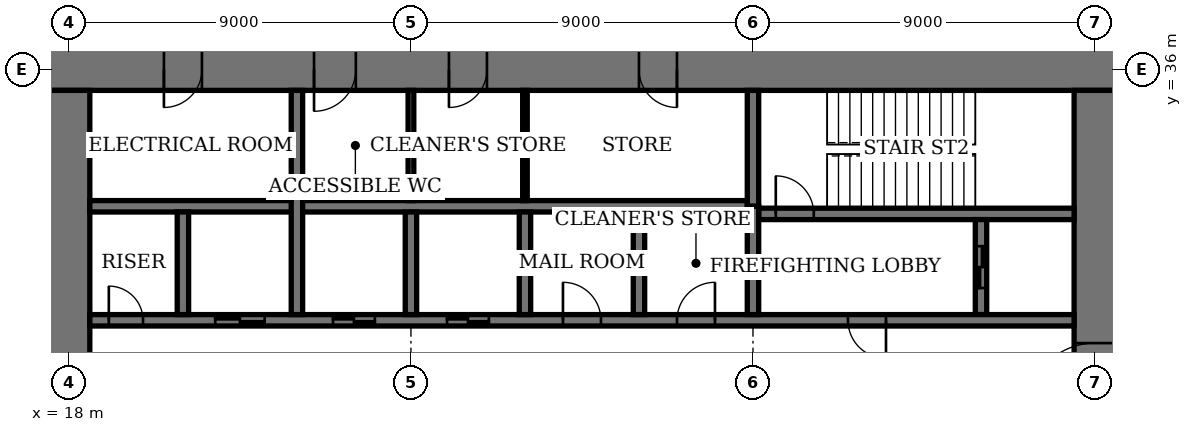
"""IFC4 building model, lengths in metres.
Left out: names, types, materials, properties, quantities, classifications, styles, units other than length and angle.
Written with IfcOpenShell. Run it as: python <this file> out.ifc"""

import sys

from ifc_helpers import new_model, si_unit, direction, frame, frame_2d, origin, place, context, subcontext, project, spatial, rectangle, extrude, element, fill, save


model = new_model("IFC4")
c1 = context("Model", 3, precision=1e-05, world=origin(), true_north=direction((0.0, 1.0)))
c2 = subcontext(c1, "Body", "Model", "MODEL_VIEW")
j1 = project(units=[si_unit("LENGTHUNIT", "METRE"), si_unit("PLANEANGLEUNIT", "RADIAN")], contexts=[c1])
p1 = place(None, origin())
s1 = spatial("IfcSite", under=j1, at=p1, CompositionType="ELEMENT")
p2 = place(p1, origin())
s2 = spatial("IfcBuilding", under=s1, at=p2, CompositionType="ELEMENT")
p3 = place(p2, frame((0.0, 0.0, 170.2)))
s3 = spatial("IfcBuildingStorey", under=s2, at=p3, CompositionType="ELEMENT", Elevation=170.2)
p4 = place(p3, frame((45.55, 36.0, 0.0), z_axis=(0.0, 0.0, 1.0), x_axis=(-1.0, 0.0, 0.0)))
e1 = element("IfcWall", 1, at=p4, inside=s3, PredefinedType="SHEAR", context=c2, shape_type="SweptSolid", body=[
    extrude(rectangle(XDim=28.1, YDim=1.1, at=frame_2d((14.05, 0.0))), origin(), (0.0, 0.0, 1.0), 4.0),
])
p5 = place(p4, frame((11.55, 0.0, 0.0)))
e2 = element("IfcOpeningElement", 2, at=p5, cuts=e1, PredefinedType="OPENING", context=c2, shape_type="SweptSolid", body=[
    extrude(rectangle(XDim=1.0, YDim=2.4, at=frame_2d((0.5, 1.2))), frame((0.0, 0.56, 0.0), z_axis=(0.0, -1.0, 0.0), x_axis=(1.0, 0.0, 0.0)), (0.0, 0.0, 1.0), 1.12),
])
p6 = place(p4, frame((16.55, 0.0, 0.0)))
e3 = element("IfcOpeningElement", 3, at=p6, cuts=e1, PredefinedType="OPENING", context=c2, shape_type="SweptSolid", body=[
    extrude(rectangle(XDim=1.0, YDim=2.4, at=frame_2d((0.5, 1.2))), frame((0.0, 0.56, 0.0), z_axis=(0.0, -1.0, 0.0), x_axis=(1.0, 0.0, 0.0)), (0.0, 0.0, 1.0), 1.12),
])
p7 = place(p4, frame((20.0, 0.0, 0.0)))
e4 = element("IfcOpeningElement", 4, at=p7, cuts=e1, PredefinedType="OPENING", context=c2, shape_type="SweptSolid", body=[
    extrude(rectangle(XDim=1.1, YDim=2.4, at=frame_2d((0.55, 1.2))), frame((0.0, 0.56, 0.0), z_axis=(0.0, -1.0, 0.0), x_axis=(1.0, 0.0, 0.0)), (0.0, 0.0, 1.0), 1.12),
])
p8 = place(p4, frame((24.05, 0.0, 0.0)))
e5 = element("IfcOpeningElement", 5, at=p8, cuts=e1, PredefinedType="OPENING", context=c2, shape_type="SweptSolid", body=[
    extrude(rectangle(XDim=1.0, YDim=2.4, at=frame_2d((0.5, 1.2))), frame((0.0, 0.56, 0.0), z_axis=(0.0, -1.0, 0.0), x_axis=(1.0, 0.0, 0.0)), (0.0, 0.0, 1.0), 1.12),
])
p9 = place(p3, frame((18.0, 35.45, 0.0), z_axis=(0.0, 0.0, 1.0), x_axis=(0.0, -1.0, 0.0)))
e6 = element("IfcWall", 6, at=p9, inside=s3, PredefinedType="SHEAR", context=c2, shape_type="SweptSolid", body=[
    extrude(rectangle(XDim=16.9, YDim=1.1, at=frame_2d((8.45, 0.0))), origin(), (0.0, 0.0, 1.0), 4.0),
])
p10 = place(p9, frame((8.45, 0.0, 0.0)))
e7 = element("IfcOpeningElement", 7, at=p10, cuts=e6, PredefinedType="OPENING", context=c2, shape_type="SweptSolid", body=[
    extrude(rectangle(XDim=1.8, YDim=2.4, at=frame_2d((0.9, 1.2))), frame((0.0, 0.56, 0.0), z_axis=(0.0, -1.0, 0.0), x_axis=(1.0, 0.0, 0.0)), (0.0, 0.0, 1.0), 1.12),
])
p11 = place(p3, frame((45.0, 18.55, 0.0), z_axis=(0.0, 0.0, 1.0), x_axis=(0.0, 1.0, 0.0)))
e8 = element("IfcWall", 8, at=p11, inside=s3, PredefinedType="SHEAR", context=c2, shape_type="SweptSolid", body=[
    extrude(rectangle(XDim=16.9, YDim=1.1, at=frame_2d((8.45, 0.0))), origin(), (0.0, 0.0, 1.0), 4.0),
])
p12 = place(p11, frame((8.45, 0.0, 0.0)))
e9 = element("IfcOpeningElement", 9, at=p12, cuts=e8, PredefinedType="OPENING", context=c2, shape_type="SweptSolid", body=[
    extrude(rectangle(XDim=1.8, YDim=2.4, at=frame_2d((0.9, 1.2))), frame((0.0, 0.56, 0.0), z_axis=(0.0, -1.0, 0.0), x_axis=(1.0, 0.0, 0.0)), (0.0, 0.0, 1.0), 1.12),
])
p13 = place(p3, frame((36.15, 32.2, 0.0), z_axis=(0.0, 0.0, 1.0), x_axis=(1.0, 0.0, 0.0)))
e10 = element("IfcWall", 10, at=p13, inside=s3, PredefinedType="SHEAR", context=c2, shape_type="SweptSolid", body=[
    extrude(rectangle(XDim=8.3, YDim=0.3, at=frame_2d((4.15, 0.0))), origin(), (0.0, 0.0, 1.0), 4.0),
])
p14 = place(p13, frame((0.45, 0.0, 0.0)))
e11 = element("IfcOpeningElement", 11, at=p14, cuts=e10, PredefinedType="OPENING", context=c2, shape_type="SweptSolid", body=[
    extrude(rectangle(XDim=1.0, YDim=2.4, at=frame_2d((0.5, 1.2))), frame((0.0, 0.16, 0.0), z_axis=(0.0, -1.0, 0.0), x_axis=(1.0, 0.0, 0.0)), (0.0, 0.0, 1.0), 0.32),
])
p15 = place(p3, frame((36.0, 32.4, 0.0), z_axis=(0.0, 0.0, 1.0), x_axis=(0.0, 1.0, 0.0)))
e12 = element("IfcWall", 12, at=p15, inside=s3, PredefinedType="SHEAR", context=c2, shape_type="SweptSolid", body=[
    extrude(rectangle(XDim=3.05, YDim=0.3, at=frame_2d((1.525, 0.0))), origin(), (0.0, 0.0, 1.0), 4.0),
])
p16 = place(p3, frame((42.0, 29.55, 0.0), z_axis=(0.0, 0.0, 1.0), x_axis=(0.0, 1.0, 0.0)))
e13 = element("IfcWall", 13, at=p16, inside=s3, PredefinedType="SHEAR", context=c2, shape_type="SweptSolid", body=[
    extrude(rectangle(XDim=2.5, YDim=0.3, at=frame_2d((1.25, 0.0))), origin(), (0.0, 0.0, 1.0), 4.0),
])
p17 = place(p16, frame((0.7, 0.0, 0.0)))
e14 = element("IfcOpeningElement", 14, at=p17, cuts=e13, PredefinedType="OPENING", context=c2, shape_type="SweptSolid", body=[
    extrude(rectangle(XDim=1.1, YDim=2.4, at=frame_2d((0.55, 1.2))), frame((0.0, 0.16, 0.0), z_axis=(0.0, -1.0, 0.0), x_axis=(1.0, 0.0, 0.0)), (0.0, 0.0, 1.0), 0.32),
])
p18 = place(p3, frame((18.55, 29.4, 0.0), z_axis=(0.0, 0.0, 1.0), x_axis=(1.0, 0.0, 0.0)))
e15 = element("IfcWall", 15, at=p18, inside=s3, PredefinedType="SHEAR", context=c2, shape_type="SweptSolid", body=[
    extrude(rectangle(XDim=25.9, YDim=0.3, at=frame_2d((12.95, 0.0))), origin(), (0.0, 0.0, 1.0), 4.0),
])
p19 = place(p18, frame((19.95, 0.0, 0.0)))
e16 = element("IfcOpeningElement", 16, at=p19, cuts=e15, PredefinedType="OPENING", context=c2, shape_type="SweptSolid", body=[
    extrude(rectangle(XDim=1.0, YDim=2.4, at=frame_2d((0.5, 1.2))), frame((0.0, 0.16, 0.0), z_axis=(0.0, -1.0, 0.0), x_axis=(1.0, 0.0, 0.0)), (0.0, 0.0, 1.0), 0.32),
])
p20 = place(p18, frame((0.5, 0.0, 0.0)))
e17 = element("IfcOpeningElement", 17, at=p20, cuts=e15, PredefinedType="OPENING", context=c2, shape_type="SweptSolid", body=[
    extrude(rectangle(XDim=0.9, YDim=2.1, at=frame_2d((0.45, 1.05))), frame((0.0, 0.16, 0.0), z_axis=(0.0, -1.0, 0.0), x_axis=(1.0, 0.0, 0.0)), (0.0, 0.0, 1.0), 0.32),
])
p21 = place(p18, frame((15.45, 0.0, 0.0)))
e18 = element("IfcOpeningElement", 18, at=p21, cuts=e15, PredefinedType="OPENING", context=c2, shape_type="SweptSolid", body=[
    extrude(rectangle(XDim=1.0, YDim=2.4, at=frame_2d((0.5, 1.2))), frame((0.0, 0.16, 0.0), z_axis=(0.0, -1.0, 0.0), x_axis=(1.0, 0.0, 0.0)), (0.0, 0.0, 1.0), 0.32),
])
p22 = place(p18, frame((12.45, 0.0, 0.0)))
e19 = element("IfcOpeningElement", 19, at=p22, cuts=e15, PredefinedType="OPENING", context=c2, shape_type="SweptSolid", body=[
    extrude(rectangle(XDim=1.0, YDim=2.4, at=frame_2d((0.5, 1.2))), frame((0.0, 0.16, 0.0), z_axis=(0.0, -1.0, 0.0), x_axis=(1.0, 0.0, 0.0)), (0.0, 0.0, 1.0), 0.32),
])
p23 = place(p18, frame((9.4, 0.0, 0.0)))
e20 = element("IfcOpeningElement", 20, at=p23, cuts=e15, PredefinedType="OPENING", context=c2, shape_type="SweptSolid", body=[
    extrude(rectangle(XDim=1.1, YDim=2.4, at=frame_2d((0.55, 1.2))), frame((0.0, 0.16, 0.0), z_axis=(0.0, -1.0, 0.0), x_axis=(1.0, 0.0, 0.0)), (0.0, 0.0, 1.0), 0.32),
])
p24 = place(p18, frame((6.4, 0.0, 0.0)))
e21 = element("IfcOpeningElement", 21, at=p24, cuts=e15, PredefinedType="OPENING", context=c2, shape_type="SweptSolid", body=[
    extrude(rectangle(XDim=1.1, YDim=2.4, at=frame_2d((0.55, 1.2))), frame((0.0, 0.16, 0.0), z_axis=(0.0, -1.0, 0.0), x_axis=(1.0, 0.0, 0.0)), (0.0, 0.0, 1.0), 0.32),
])
p25 = place(p18, frame((3.3, 0.0, 0.0)))
e22 = element("IfcOpeningElement", 22, at=p25, cuts=e15, PredefinedType="OPENING", context=c2, shape_type="SweptSolid", body=[
    extrude(rectangle(XDim=1.3, YDim=2.4, at=frame_2d((0.65, 1.2))), frame((0.0, 0.16, 0.0), z_axis=(0.0, -1.0, 0.0), x_axis=(1.0, 0.0, 0.0)), (0.0, 0.0, 1.0), 0.32),
])
p26 = place(p3, frame((18.55, 32.4, 0.0), z_axis=(0.0, 0.0, 1.0), x_axis=(1.0, 0.0, 0.0)))
e23 = element("IfcWall", 23, at=p26, inside=s3, PredefinedType="SHEAR", context=c2, shape_type="SweptSolid", body=[
    extrude(rectangle(XDim=17.3, YDim=0.3, at=frame_2d((8.65, 0.0))), origin(), (0.0, 0.0, 1.0), 4.0),
])
for number, where, z_axis, x_axis in (
    (24, (33.0, 29.55, 0.0), (0.0, 0.0, 1.0), (0.0, 1.0, 0.0)),
    (25, (30.0, 29.55, 0.0), (0.0, 0.0, 1.0), (0.0, 1.0, 0.0)),
    (26, (27.0, 29.55, 0.0), (0.0, 0.0, 1.0), (0.0, 1.0, 0.0)),
):
    element("IfcWall", number, at=place(p3, frame(where, z_axis=z_axis, x_axis=x_axis)), inside=s3, PredefinedType="SHEAR", context=c2, shape_type="SweptSolid", body=[
        extrude(rectangle(XDim=2.7, YDim=0.3, at=frame_2d((1.35, 0.0))), origin(), (0.0, 0.0, 1.0), 4.0),
    ])
p27 = place(p3, frame((24.0, 29.55, 0.0), z_axis=(0.0, 0.0, 1.0), x_axis=(0.0, 1.0, 0.0)))
e27 = element("IfcWall", 27, at=p27, inside=s3, PredefinedType="SHEAR", context=c2, shape_type="SweptSolid", body=[
    extrude(rectangle(XDim=5.9, YDim=0.3, at=frame_2d((2.95, 0.0))), origin(), (0.0, 0.0, 1.0), 4.0),
])
p28 = place(p3, frame((21.0, 29.55, 0.0), z_axis=(0.0, 0.0, 1.0), x_axis=(0.0, 1.0, 0.0)))
e28 = element("IfcWall", 28, at=p28, inside=s3, PredefinedType="SHEAR", context=c2, shape_type="SweptSolid", body=[
    extrude(rectangle(XDim=2.7, YDim=0.3, at=frame_2d((1.35, 0.0))), origin(), (0.0, 0.0, 1.0), 4.0),
])
p29 = place(p3, frame((36.0, 29.55, 0.0), z_axis=(0.0, 0.0, 1.0), x_axis=(0.0, 1.0, 0.0)))
e29 = element("IfcWall", 29, at=p29, inside=s3, PredefinedType="SHEAR", context=c2, shape_type="SweptSolid", body=[
    extrude(rectangle(XDim=2.85, YDim=0.3, at=frame_2d((1.425, 0.0))), origin(), (0.0, 0.0, 1.0), 4.0),
])
p30 = place(p3, frame((30.0, 32.55, 0.0), z_axis=(0.0, 0.0, 1.0), x_axis=(0.0, 1.0, 0.0)))
e30 = element("IfcWall", 30, at=p30, inside=s3, PredefinedType="PARTITIONING", context=c2, shape_type="SweptSolid", body=[
    extrude(rectangle(XDim=2.9, YDim=0.12, at=frame_2d((1.45, 0.0))), origin(), (0.0, 0.0, 1.0), 3.75),
])
p31 = place(p3, frame((27.0, 32.55, 0.0), z_axis=(0.0, 0.0, 1.0), x_axis=(0.0, 1.0, 0.0)))
e31 = element("IfcWall", 31, at=p31, inside=s3, PredefinedType="PARTITIONING", context=c2, shape_type="SweptSolid", body=[
    extrude(rectangle(XDim=2.9, YDim=0.15, at=frame_2d((1.45, 0.0))), origin(), (0.0, 0.0, 1.0), 3.75),
])
p32 = place(p12, origin())
e32 = element("IfcDoor", 32, at=p32, inside=s3, OperationType="DOUBLE_DOOR_DOUBLE_SWING", PredefinedType="DOOR", context=c2, shape_type="SweptSolid", body=[
    extrude(rectangle(XDim=1.8, YDim=2.4, at=frame_2d((0.9, 1.2))), frame((0.0, 0.03, 0.0), z_axis=(0.0, -1.0, 0.0), x_axis=(1.0, 0.0, 0.0)), (0.0, 0.0, 1.0), 0.06),
    extrude(rectangle(XDim=0.04, YDim=2.4, at=frame_2d((0.02, 1.2))), frame((0.0, 0.55, 0.0), z_axis=(0.0, -1.0, 0.0), x_axis=(1.0, 0.0, 0.0)), (0.0, 0.0, 1.0), 1.1),
    extrude(rectangle(XDim=0.04, YDim=2.4, at=frame_2d((1.78, 1.2))), frame((0.0, 0.55, 0.0), z_axis=(0.0, -1.0, 0.0), x_axis=(1.0, 0.0, 0.0)), (0.0, 0.0, 1.0), 1.1),
    extrude(rectangle(XDim=1.8, YDim=0.04, at=frame_2d((0.9, 2.38))), frame((0.0, 0.55, 0.0), z_axis=(0.0, -1.0, 0.0), x_axis=(1.0, 0.0, 0.0)), (0.0, 0.0, 1.0), 1.1),
])
fill(e9, e32)
p33 = place(p5, origin())
e33 = element("IfcDoor", 33, at=p33, inside=s3, OperationType="SINGLE_SWING_RIGHT", PredefinedType="DOOR", context=c2, shape_type="SweptSolid", body=[
    extrude(rectangle(XDim=1.0, YDim=2.4, at=frame_2d((0.5, 1.2))), frame((0.0, 0.025, 0.0), z_axis=(0.0, -1.0, 0.0), x_axis=(1.0, 0.0, 0.0)), (0.0, 0.0, 1.0), 0.05),
    extrude(rectangle(XDim=0.04, YDim=2.4, at=frame_2d((0.02, 1.2))), frame((0.0, 0.4, 0.0), z_axis=(0.0, -1.0, 0.0), x_axis=(1.0, 0.0, 0.0)), (0.0, 0.0, 1.0), 0.8),
    extrude(rectangle(XDim=0.04, YDim=2.4, at=frame_2d((0.98, 1.2))), frame((0.0, 0.4, 0.0), z_axis=(0.0, -1.0, 0.0), x_axis=(1.0, 0.0, 0.0)), (0.0, 0.0, 1.0), 0.8),
    extrude(rectangle(XDim=1.0, YDim=0.04, at=frame_2d((0.5, 2.38))), frame((0.0, 0.4, 0.0), z_axis=(0.0, -1.0, 0.0), x_axis=(1.0, 0.0, 0.0)), (0.0, 0.0, 1.0), 0.8),
])
fill(e2, e33)
p34 = place(p6, origin())
e34 = element("IfcDoor", 34, at=p34, inside=s3, OperationType="SINGLE_SWING_LEFT", PredefinedType="DOOR", context=c2, shape_type="SweptSolid", body=[
    extrude(rectangle(XDim=1.0, YDim=2.4, at=frame_2d((0.5, 1.2))), frame((0.0, 0.025, 0.0), z_axis=(0.0, -1.0, 0.0), x_axis=(1.0, 0.0, 0.0)), (0.0, 0.0, 1.0), 0.05),
    extrude(rectangle(XDim=0.04, YDim=2.4, at=frame_2d((0.02, 1.2))), frame((0.0, 0.4, 0.0), z_axis=(0.0, -1.0, 0.0), x_axis=(1.0, 0.0, 0.0)), (0.0, 0.0, 1.0), 0.8),
    extrude(rectangle(XDim=0.04, YDim=2.4, at=frame_2d((0.98, 1.2))), frame((0.0, 0.4, 0.0), z_axis=(0.0, -1.0, 0.0), x_axis=(1.0, 0.0, 0.0)), (0.0, 0.0, 1.0), 0.8),
    extrude(rectangle(XDim=1.0, YDim=0.04, at=frame_2d((0.5, 2.38))), frame((0.0, 0.4, 0.0), z_axis=(0.0, -1.0, 0.0), x_axis=(1.0, 0.0, 0.0)), (0.0, 0.0, 1.0), 0.8),
])
fill(e3, e34)
p35 = place(p7, origin())
e35 = element("IfcDoor", 35, at=p35, inside=s3, OperationType="SINGLE_SWING_LEFT", PredefinedType="DOOR", context=c2, shape_type="SweptSolid", body=[
    extrude(rectangle(XDim=1.1, YDim=2.4, at=frame_2d((0.55, 1.2))), frame((0.0, 0.025, 0.0), z_axis=(0.0, -1.0, 0.0), x_axis=(1.0, 0.0, 0.0)), (0.0, 0.0, 1.0), 0.05),
    extrude(rectangle(XDim=0.04, YDim=2.4, at=frame_2d((0.02, 1.2))), frame((0.0, 0.44, 0.0), z_axis=(0.0, -1.0, 0.0), x_axis=(1.0, 0.0, 0.0)), (0.0, 0.0, 1.0), 0.88),
    extrude(rectangle(XDim=0.04, YDim=2.4, at=frame_2d((1.08, 1.2))), frame((0.0, 0.44, 0.0), z_axis=(0.0, -1.0, 0.0), x_axis=(1.0, 0.0, 0.0)), (0.0, 0.0, 1.0), 0.88),
    extrude(rectangle(XDim=1.1, YDim=0.04, at=frame_2d((0.55, 2.38))), frame((0.0, 0.44, 0.0), z_axis=(0.0, -1.0, 0.0), x_axis=(1.0, 0.0, 0.0)), (0.0, 0.0, 1.0), 0.88),
])
fill(e4, e35)
p36 = place(p8, origin())
e36 = element("IfcDoor", 36, at=p36, inside=s3, OperationType="SINGLE_SWING_LEFT", PredefinedType="DOOR", context=c2, shape_type="SweptSolid", body=[
    extrude(rectangle(XDim=1.0, YDim=2.4, at=frame_2d((0.5, 1.2))), frame((0.0, 0.025, 0.0), z_axis=(0.0, -1.0, 0.0), x_axis=(1.0, 0.0, 0.0)), (0.0, 0.0, 1.0), 0.05),
    extrude(rectangle(XDim=0.04, YDim=2.4, at=frame_2d((0.02, 1.2))), frame((0.0, 0.4, 0.0), z_axis=(0.0, -1.0, 0.0), x_axis=(1.0, 0.0, 0.0)), (0.0, 0.0, 1.0), 0.8),
    extrude(rectangle(XDim=0.04, YDim=2.4, at=frame_2d((0.98, 1.2))), frame((0.0, 0.4, 0.0), z_axis=(0.0, -1.0, 0.0), x_axis=(1.0, 0.0, 0.0)), (0.0, 0.0, 1.0), 0.8),
    extrude(rectangle(XDim=1.0, YDim=0.04, at=frame_2d((0.5, 2.38))), frame((0.0, 0.4, 0.0), z_axis=(0.0, -1.0, 0.0), x_axis=(1.0, 0.0, 0.0)), (0.0, 0.0, 1.0), 0.8),
])
fill(e5, e36)
p37 = place(p14, origin())
e37 = element("IfcDoor", 37, at=p37, inside=s3, OperationType="SINGLE_SWING_RIGHT", PredefinedType="DOOR", context=c2, shape_type="SweptSolid", body=[
    extrude(rectangle(XDim=1.0, YDim=2.4, at=frame_2d((0.5, 1.2))), frame((0.0, 0.03, 0.0), z_axis=(0.0, -1.0, 0.0), x_axis=(1.0, 0.0, 0.0)), (0.0, 0.0, 1.0), 0.06),
])
fill(e11, e37)
p38 = place(p19, origin())
e38 = element("IfcDoor", 38, at=p38, inside=s3, OperationType="SINGLE_SWING_RIGHT", PredefinedType="DOOR", context=c2, shape_type="SweptSolid", body=[
    extrude(rectangle(XDim=1.0, YDim=2.4, at=frame_2d((0.5, 1.2))), frame((0.0, 0.03, 0.0), z_axis=(0.0, -1.0, 0.0), x_axis=(1.0, 0.0, 0.0)), (0.0, 0.0, 1.0), 0.06),
])
fill(e16, e38)
p39 = place(p20, origin())
e39 = element("IfcDoor", 39, at=p39, inside=s3, OperationType="SINGLE_SWING_RIGHT", PredefinedType="DOOR", context=c2, shape_type="SweptSolid", body=[
    extrude(rectangle(XDim=0.9, YDim=2.1, at=frame_2d((0.45, 1.05))), frame((0.0, 0.03, 0.0), z_axis=(0.0, -1.0, 0.0), x_axis=(1.0, 0.0, 0.0)), (0.0, 0.0, 1.0), 0.06),
])
fill(e17, e39)
p40 = place(p21, origin())
e40 = element("IfcDoor", 40, at=p40, inside=s3, OperationType="SINGLE_SWING_LEFT", PredefinedType="DOOR", context=c2, shape_type="SweptSolid", body=[
    extrude(rectangle(XDim=1.0, YDim=2.4, at=frame_2d((0.5, 1.2))), frame((0.0, 0.03, 0.0), z_axis=(0.0, -1.0, 0.0), x_axis=(1.0, 0.0, 0.0)), (0.0, 0.0, 1.0), 0.06),
])
fill(e18, e40)
p41 = place(p22, origin())
e41 = element("IfcDoor", 41, at=p41, inside=s3, OperationType="SINGLE_SWING_RIGHT", PredefinedType="DOOR", context=c2, shape_type="SweptSolid", body=[
    extrude(rectangle(XDim=1.0, YDim=2.4, at=frame_2d((0.5, 1.2))), frame((0.0, 0.03, 0.0), z_axis=(0.0, -1.0, 0.0), x_axis=(1.0, 0.0, 0.0)), (0.0, 0.0, 1.0), 0.06),
])
fill(e19, e41)
p42 = place(p23, origin())
e42 = element("IfcDoor", 42, at=p42, inside=s3, OperationType="DOUBLE_DOOR_SLIDING", PredefinedType="DOOR", context=c2, shape_type="SweptSolid", body=[
    extrude(rectangle(XDim=1.1, YDim=2.4, at=frame_2d((0.55, 1.2))), frame((0.0, 0.02, 0.0), z_axis=(0.0, -1.0, 0.0), x_axis=(1.0, 0.0, 0.0)), (0.0, 0.0, 1.0), 0.04),
])
fill(e20, e42)
p43 = place(p24, origin())
e43 = element("IfcDoor", 43, at=p43, inside=s3, OperationType="DOUBLE_DOOR_SLIDING", PredefinedType="DOOR", context=c2, shape_type="SweptSolid", body=[
    extrude(rectangle(XDim=1.1, YDim=2.4, at=frame_2d((0.55, 1.2))), frame((0.0, 0.02, 0.0), z_axis=(0.0, -1.0, 0.0), x_axis=(1.0, 0.0, 0.0)), (0.0, 0.0, 1.0), 0.04),
])
fill(e21, e43)
p44 = place(p25, origin())
e44 = element("IfcDoor", 44, at=p44, inside=s3, OperationType="DOUBLE_DOOR_SLIDING", PredefinedType="DOOR", context=c2, shape_type="SweptSolid", body=[
    extrude(rectangle(XDim=1.3, YDim=2.4, at=frame_2d((0.65, 1.2))), frame((0.0, 0.02, 0.0), z_axis=(0.0, -1.0, 0.0), x_axis=(1.0, 0.0, 0.0)), (0.0, 0.0, 1.0), 0.04),
])
fill(e22, e44)
p45 = place(p17, origin())
e45 = element("IfcDoor", 45, at=p45, inside=s3, OperationType="DOUBLE_DOOR_SLIDING", PredefinedType="DOOR", context=c2, shape_type="SweptSolid", body=[
    extrude(rectangle(XDim=1.1, YDim=2.4, at=frame_2d((0.55, 1.2))), frame((0.0, 0.03, 0.0), z_axis=(0.0, -1.0, 0.0), x_axis=(1.0, 0.0, 0.0)), (0.0, 0.0, 1.0), 0.06),
])
fill(e14, e45)
save(model, sys.argv[1])
